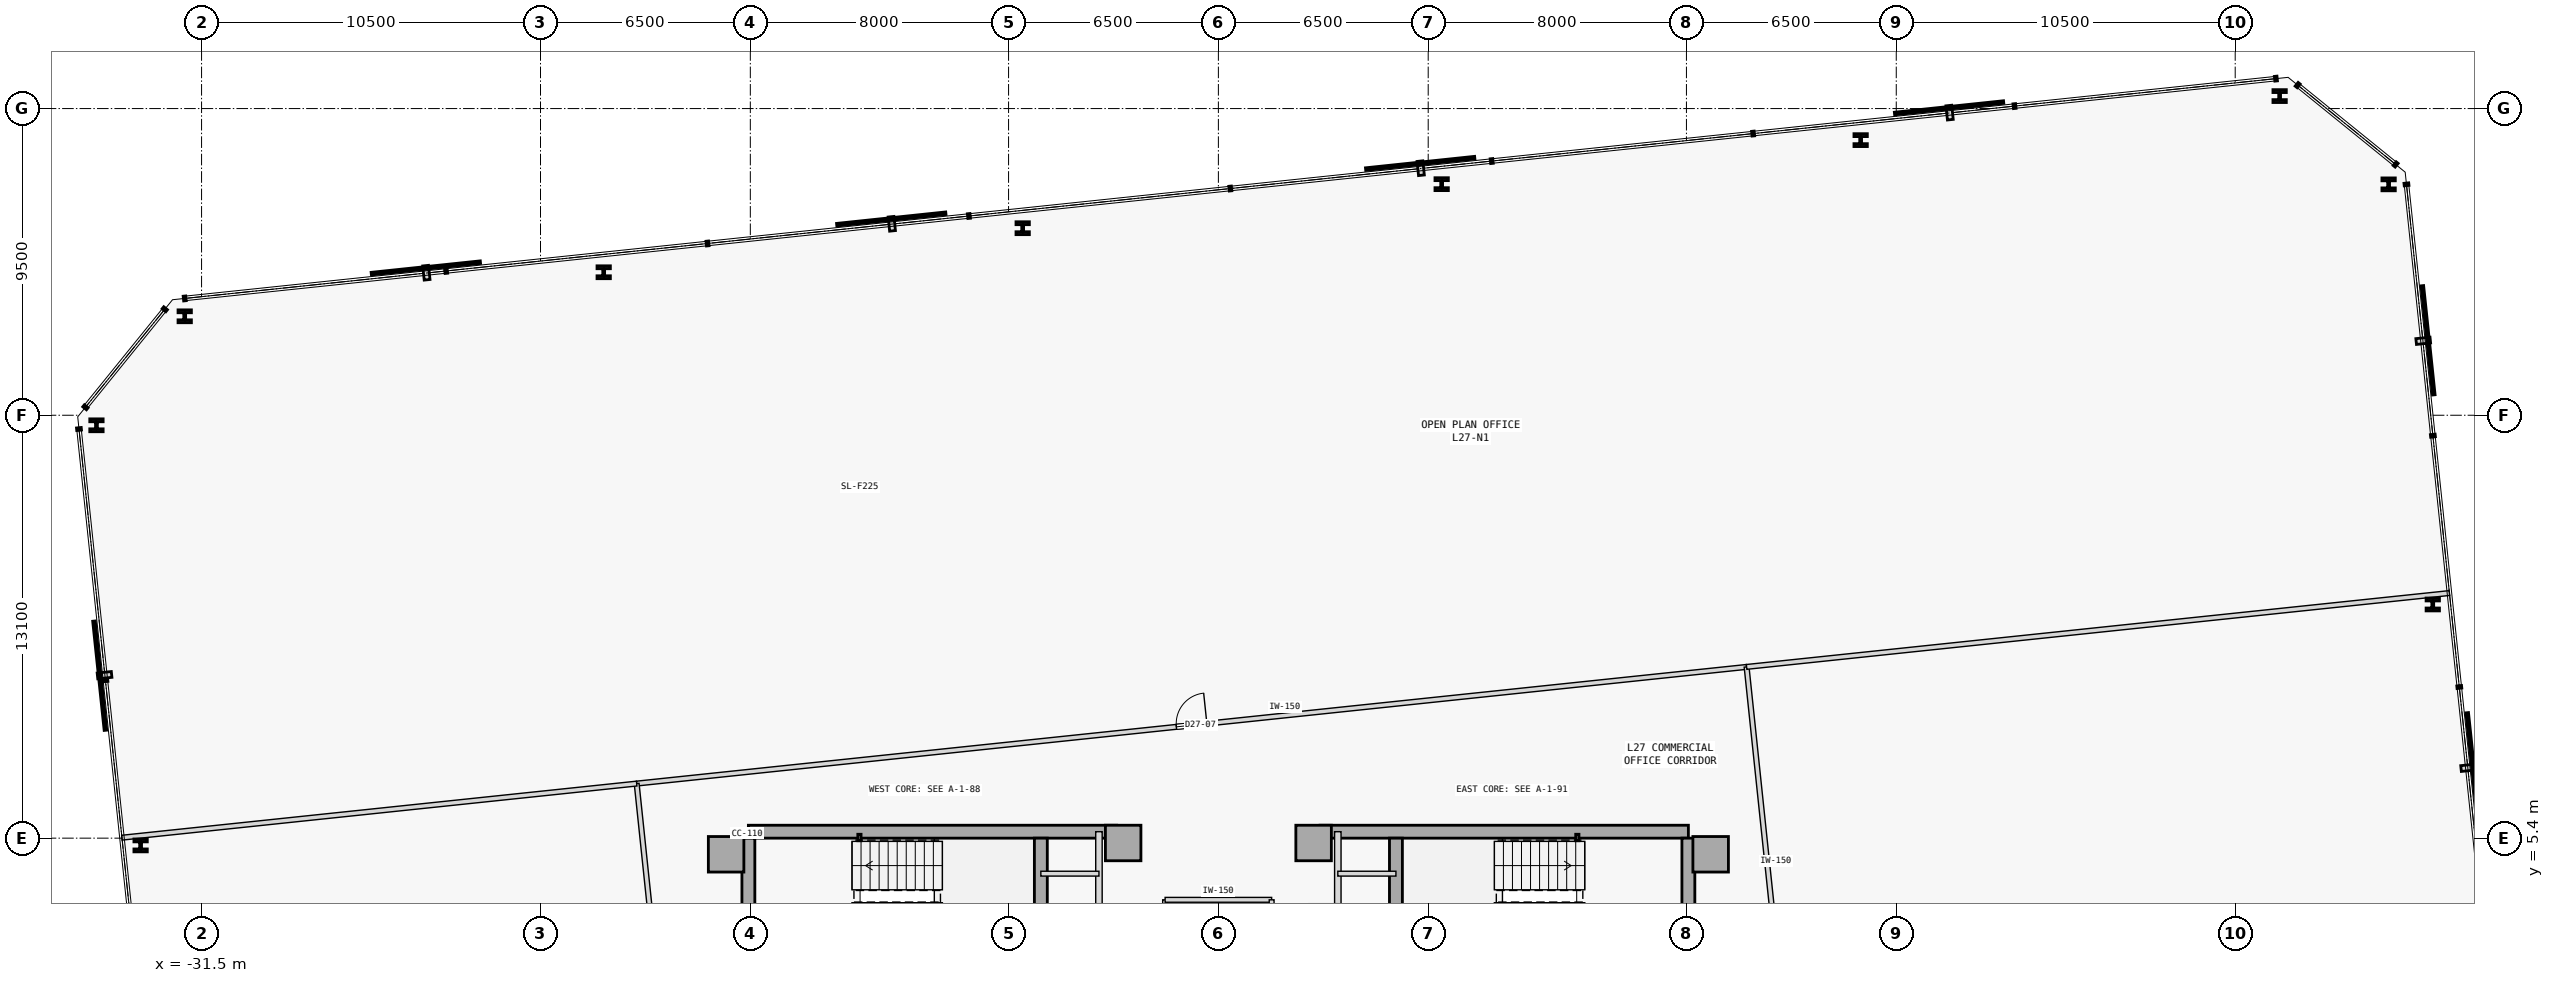
"""IFC4 building model, lengths in metres.
Left out: names, types, materials, properties, quantities, classifications, styles, units other than length and angle.
Written with IfcOpenShell. Run it as: python <this file> out.ifc"""

import sys

from ifc_helpers import new_model, si_unit, direction, frame, frame_2d, origin, origin_2d, place, context, subcontext, project, spatial, rectangle, hollow_rectangle, i_section, extrude, element, fill, save


model = new_model("IFC4")
c1 = context("Model", 3, precision=1e-05, world=origin(), true_north=direction((0.0, 1.0)))
c2 = subcontext(c1, "Body", "Model", "MODEL_VIEW")
j1 = project(units=[si_unit("LENGTHUNIT", "METRE"), si_unit("PLANEANGLEUNIT", "RADIAN")], contexts=[c1])
p1 = place(None, origin())
s1 = spatial("IfcSite", under=j1, at=p1, CompositionType="ELEMENT")
p2 = place(p1, origin())
s2 = spatial("IfcBuilding", under=s1, at=p2, CompositionType="ELEMENT")
p3 = place(p2, frame((0.0, 0.0, 109.6)))
s3 = spatial("IfcBuildingStorey", under=s2, at=p3, CompositionType="ELEMENT", Elevation=109.6)
for number, where, z_axis, x_axis in (
    (1, (-15.25, 4.9, 0.0), (0.0, 0.0, 1.0), (1.0, 0.0, 0.0)),
    (2, (-2.95, 5.25, 0.0), (0.0, 0.0, 1.0), (1.0, 0.0, 0.0)),
    (3, (15.25, 4.9, 0.0), (0.0, 0.0, 1.0), (1.0, 0.0, 0.0)),
    (4, (2.95, 5.25, 0.0), (0.0, 0.0, 1.0), (1.0, 0.0, 0.0)),
):
    element("IfcColumn", number, at=place(p3, frame(where, z_axis=z_axis, x_axis=x_axis)), inside=s3, PredefinedType="COLUMN", context=c2, shape_type="SweptSolid", body=[
        extrude(rectangle(XDim=1.1, YDim=1.1, at=origin_2d()), origin(), (0.0, 0.0, 1.0), 3.7),
    ])
p4 = place(p3, frame((-14.56, 5.6, 0.0), z_axis=(0.0, 0.0, 1.0), x_axis=(1.0, 0.0, 0.0)))
e5 = element("IfcWall", 5, at=p4, inside=s3, PredefinedType="SHEAR", context=c2, shape_type="SweptSolid", body=[
    extrude(rectangle(XDim=11.41, YDim=0.4, at=frame_2d((5.705, 0.0))), origin(), (0.0, 0.0, 1.0), 3.475),
])
p5 = place(p3, frame((-14.56, -5.4, 0.0), z_axis=(0.0, 0.0, 1.0), x_axis=(0.0, 1.0, 0.0)))
e6 = element("IfcWall", 6, at=p5, inside=s3, PredefinedType="SHEAR", context=c2, shape_type="SweptSolid", body=[
    extrude(rectangle(XDim=10.8, YDim=0.4, at=frame_2d((5.4, 0.0))), origin(), (0.0, 0.0, 1.0), 3.475),
])
p6 = place(p3, frame((-5.5, 2.15, 0.0), z_axis=(0.0, 0.0, 1.0), x_axis=(0.0, 1.0, 0.0)))
e7 = element("IfcWall", 7, at=p6, inside=s3, PredefinedType="SHEAR", context=c2, shape_type="SweptSolid", body=[
    extrude(rectangle(XDim=3.25, YDim=0.4, at=frame_2d((1.625, 0.0))), origin(), (0.0, 0.0, 1.0), 3.475),
])
p7 = place(p3, frame((3.15, 5.6, 0.0), z_axis=(0.0, 0.0, 1.0), x_axis=(1.0, 0.0, 0.0)))
e8 = element("IfcWall", 8, at=p7, inside=s3, PredefinedType="SHEAR", context=c2, shape_type="SweptSolid", body=[
    extrude(rectangle(XDim=11.41, YDim=0.4, at=frame_2d((5.705, 0.0))), origin(), (0.0, 0.0, 1.0), 3.475),
])
p8 = place(p3, frame((14.56, -5.4, 0.0), z_axis=(0.0, 0.0, 1.0), x_axis=(0.0, 1.0, 0.0)))
e9 = element("IfcWall", 9, at=p8, inside=s3, PredefinedType="SHEAR", context=c2, shape_type="SweptSolid", body=[
    extrude(rectangle(XDim=10.8, YDim=0.4, at=frame_2d((5.4, 0.0))), origin(), (0.0, 0.0, 1.0), 3.475),
])
p9 = place(p3, frame((5.5, 2.15, 0.0), z_axis=(0.0, 0.0, 1.0), x_axis=(0.0, 1.0, 0.0)))
e10 = element("IfcWall", 10, at=p9, inside=s3, PredefinedType="SHEAR", context=c2, shape_type="SweptSolid", body=[
    extrude(rectangle(XDim=3.25, YDim=0.4, at=frame_2d((1.625, 0.0))), origin(), (0.0, 0.0, 1.0), 3.475),
])
for number, where, z_axis, x_axis in (
    (11, (-11.12, 5.42, 0.0), (0.0, 0.0, 1.0), (1.0, 0.0, 0.0)),
    (12, (11.12, 5.42, 0.0), (0.0, 0.0, 1.0), (1.0, 0.0, 0.0)),
):
    element("IfcColumn", number, at=place(p3, frame(where, z_axis=z_axis, x_axis=x_axis)), inside=s3, PredefinedType="COLUMN", context=c2, shape_type="SweptSolid", body=[
        extrude(hollow_rectangle(XDim=0.1, YDim=0.2, WallThickness=0.008, at=origin_2d()), origin(), (0.0, 0.0, 1.0), 3.7),
    ])
for number, where, z_axis, x_axis in (
    (13, (37.621, 12.638, 0.0), (0.0, 0.0, 1.0), (1.0, 0.0, 0.0)),
    (14, (36.253, 25.652, 0.0), (0.0, 0.0, 1.0), (1.0, 0.0, 0.0)),
    (15, (32.876, 28.386, 0.0), (0.0, 0.0, 1.0), (1.0, 0.0, 0.0)),
    (16, (19.897, 27.022, 0.0), (0.0, 0.0, 1.0), (1.0, 0.0, 0.0)),
    (17, (6.917, 25.658, 0.0), (0.0, 0.0, 1.0), (1.0, 0.0, 0.0)),
    (18, (-6.062, 24.293, 0.0), (0.0, 0.0, 1.0), (1.0, 0.0, 0.0)),
    (19, (-19.042, 22.929, 0.0), (0.0, 0.0, 1.0), (1.0, 0.0, 0.0)),
    (20, (-32.022, 21.565, 0.0), (0.0, 0.0, 1.0), (1.0, 0.0, 0.0)),
    (21, (-34.756, 18.189, 0.0), (0.0, 0.0, 1.0), (1.0, 0.0, 0.0)),
    (22, (-33.388, 5.175, 0.0), (0.0, 0.0, 1.0), (1.0, 0.0, 0.0)),
):
    element("IfcColumn", number, at=place(p3, frame(where, z_axis=z_axis, x_axis=x_axis)), inside=s3, PredefinedType="COLUMN", context=c2, shape_type="SweptSolid", body=[
        extrude(i_section(OverallWidth=0.413, OverallDepth=0.398, WebThickness=0.056, FlangeThickness=0.089, FilletRadius=0.015, at=origin_2d()), origin(), (0.0, 0.0, 1.0), 3.7),
    ])
p10 = place(p3, frame((-3.7, -1.15, 0.0), z_axis=(0.0, 0.0, 1.0), x_axis=(0.0, 1.0, 0.0)))
e23 = element("IfcWall", 23, at=p10, inside=s3, PredefinedType="STANDARD", context=c2, shape_type="SweptSolid", body=[
    extrude(rectangle(XDim=6.75, YDim=0.2, at=frame_2d((3.375, 0.0))), origin(), (0.0, 0.0, 1.0), 3.475),
])
p11 = place(p10, frame((3.6, 0.0, 0.0)))
e24 = element("IfcOpeningElement", 24, at=p11, cuts=e23, PredefinedType="OPENING", context=c2, shape_type="SweptSolid", body=[
    extrude(rectangle(XDim=0.92, YDim=2.15, at=frame_2d((0.46, 1.075))), frame((0.0, 0.11, 0.0), z_axis=(0.0, -1.0, 0.0), x_axis=(1.0, 0.0, 0.0)), (0.0, 0.0, 1.0), 0.22),
])
p12 = place(p10, frame((0.85, 0.0, 0.0)))
e25 = element("IfcOpeningElement", 25, at=p12, cuts=e23, PredefinedType="OPENING", context=c2, shape_type="SweptSolid", body=[
    extrude(rectangle(XDim=0.9, YDim=2.15, at=frame_2d((0.45, 1.075))), frame((0.0, 0.11, 0.0), z_axis=(0.0, -1.0, 0.0), x_axis=(1.0, 0.0, 0.0)), (0.0, 0.0, 1.0), 0.22),
])
p13 = place(p3, frame((3.7, -1.15, 0.0), z_axis=(0.0, 0.0, 1.0), x_axis=(0.0, 1.0, 0.0)))
e26 = element("IfcWall", 26, at=p13, inside=s3, PredefinedType="STANDARD", context=c2, shape_type="SweptSolid", body=[
    extrude(rectangle(XDim=6.75, YDim=0.2, at=frame_2d((3.375, 0.0))), origin(), (0.0, 0.0, 1.0), 3.475),
])
p14 = place(p13, frame((3.6, 0.0, 0.0)))
e27 = element("IfcOpeningElement", 27, at=p14, cuts=e26, PredefinedType="OPENING", context=c2, shape_type="SweptSolid", body=[
    extrude(rectangle(XDim=0.92, YDim=2.15, at=frame_2d((0.46, 1.075))), frame((0.0, 0.11, 0.0), z_axis=(0.0, -1.0, 0.0), x_axis=(1.0, 0.0, 0.0)), (0.0, 0.0, 1.0), 0.22),
])
for number, where, z_axis, x_axis in (
    (28, (-5.5, 4.3, 0.0), (0.0, 0.0, 1.0), (1.0, 0.0, 0.0)),
    (29, (3.7, 4.3, 0.0), (0.0, 0.0, 1.0), (1.0, 0.0, 0.0)),
):
    element("IfcWall", number, at=place(p3, frame(where, z_axis=z_axis, x_axis=x_axis)), inside=s3, PredefinedType="PARTITIONING", context=c2, shape_type="SweptSolid", body=[
        extrude(rectangle(XDim=1.8, YDim=0.15, at=frame_2d((0.9, 0.0))), origin(), (0.0, 0.0, 1.0), 3.475),
    ])
p15 = place(p3, frame((-1.65, -3.49, 0.0), z_axis=(0.0, 0.0, 1.0), x_axis=(-0.000104928124, 0.999999994495, 0.0)))
e30 = element("IfcWall", 30, at=p15, inside=s3, PredefinedType="PARTITIONING", context=c2, shape_type="SweptSolid", body=[
    extrude(rectangle(XDim=6.98, YDim=0.15, at=frame_2d((3.49, 0.0))), origin(), (0.0, 0.0, 1.0), 3.475),
])
p16 = place(p15, frame((3.015, 0.0, 0.0)))
e31 = element("IfcOpeningElement", 31, at=p16, cuts=e30, PredefinedType="OPENING", context=c2, shape_type="SweptSolid", body=[
    extrude(rectangle(XDim=0.95, YDim=2.15, at=frame_2d((0.475, 1.075))), frame((0.0, 0.085, 0.0), z_axis=(0.0, -1.0, 0.0), x_axis=(1.0, 0.0, 0.0)), (0.0, 0.0, 1.0), 0.17),
])
p17 = place(p3, frame((-1.65, 3.49, 0.0), z_axis=(0.0, 0.0, 1.0), x_axis=(1.0, 0.0, 0.0)))
e32 = element("IfcWall", 32, at=p17, inside=s3, PredefinedType="PARTITIONING", context=c2, shape_type="SweptSolid", body=[
    extrude(rectangle(XDim=3.3, YDim=0.15, at=frame_2d((1.65, 0.0))), origin(), (0.0, 0.0, 1.0), 3.475),
])
p18 = place(p3, frame((1.65, -3.49, 0.0), z_axis=(0.0, 0.0, 1.0), x_axis=(-6.9952083e-05, 0.999999997553, 0.0)))
e33 = element("IfcWall", 33, at=p18, inside=s3, PredefinedType="PARTITIONING", context=c2, shape_type="SweptSolid", body=[
    extrude(rectangle(XDim=6.98, YDim=0.15, at=frame_2d((3.49, 0.0))), origin(), (0.0, 0.0, 1.0), 3.475),
])
p19 = place(p3, frame((-18.021, 7.09, 0.0), z_axis=(0.0, 0.0, 1.0), x_axis=(0.994522464549, 0.104523047737, 0.0)))
e34 = element("IfcWall", 34, at=p19, inside=s3, PredefinedType="PARTITIONING", context=c2, shape_type="SweptSolid", body=[
    extrude(rectangle(XDim=34.574, YDim=0.15, at=frame_2d((17.287, 0.0))), origin(), (0.0, 0.0, 1.0), 3.475),
])
p20 = place(p19, frame((16.812, 0.0, 0.0)))
e35 = element("IfcOpeningElement", 35, at=p20, cuts=e34, PredefinedType="OPENING", context=c2, shape_type="SweptSolid", body=[
    extrude(rectangle(XDim=0.95, YDim=2.15, at=frame_2d((0.475, 1.075))), frame((0.0, 0.085, 0.0), z_axis=(0.0, -1.0, 0.0), x_axis=(1.0, 0.0, 0.0)), (0.0, 0.0, 1.0), 0.17),
])
p21 = place(p3, frame((-16.153, -10.682, 0.0), z_axis=(0.0, 0.0, 1.0), x_axis=(-0.104527614588, 0.994521984568, 0.0)))
e36 = element("IfcWall", 36, at=p21, inside=s3, PredefinedType="PARTITIONING", context=c2, shape_type="SweptSolid", body=[
    extrude(rectangle(XDim=17.87, YDim=0.15, at=frame_2d((8.935, 0.0))), origin(), (0.0, 0.0, 1.0), 3.475),
])
p22 = place(p21, frame((8.46, 0.0, 0.0)))
e37 = element("IfcOpeningElement", 37, at=p22, cuts=e36, PredefinedType="OPENING", context=c2, shape_type="SweptSolid", body=[
    extrude(rectangle(XDim=0.95, YDim=2.15, at=frame_2d((0.475, 1.075))), frame((0.0, 0.085, 0.0), z_axis=(0.0, -1.0, 0.0), x_axis=(1.0, 0.0, 0.0)), (0.0, 0.0, 1.0), 0.17),
])
p23 = place(p3, frame((18.231, -7.068, 0.0), z_axis=(0.0, 0.0, 1.0), x_axis=(-0.104529034836, 0.994521835294, 0.0)))
e38 = element("IfcWall", 38, at=p23, inside=s3, PredefinedType="PARTITIONING", context=c2, shape_type="SweptSolid", body=[
    extrude(rectangle(XDim=17.87, YDim=0.15, at=frame_2d((8.935, 0.0))), origin(), (0.0, 0.0, 1.0), 3.475),
])
p24 = place(p23, frame((8.46, 0.0, 0.0)))
e39 = element("IfcOpeningElement", 39, at=p24, cuts=e38, PredefinedType="OPENING", context=c2, shape_type="SweptSolid", body=[
    extrude(rectangle(XDim=0.95, YDim=2.15, at=frame_2d((0.475, 1.075))), frame((0.0, 0.085, 0.0), z_axis=(0.0, -1.0, 0.0), x_axis=(1.0, 0.0, 0.0)), (0.0, 0.0, 1.0), 0.17),
])
p25 = place(p3, frame((-33.967, 5.414, 0.0), z_axis=(0.0, 0.0, 1.0), x_axis=(0.994521211213, 0.104534972363, 0.0)))
e40 = element("IfcWall", 40, at=p25, inside=s3, PredefinedType="PARTITIONING", context=c2, shape_type="SweptSolid", body=[
    extrude(rectangle(XDim=16.033, YDim=0.15, at=frame_2d((8.017, 0.0))), origin(), (0.0, 0.0, 1.0), 3.475),
])
p26 = place(p3, frame((16.363, 10.704, 0.0), z_axis=(0.0, 0.0, 1.0), x_axis=(0.994521206634, 0.104535015934, 0.0)))
e41 = element("IfcWall", 41, at=p26, inside=s3, PredefinedType="PARTITIONING", context=c2, shape_type="SweptSolid", body=[
    extrude(rectangle(XDim=21.893, YDim=0.15, at=frame_2d((10.946, 0.0))), origin(), (0.0, 0.0, 1.0), 3.475),
])
p27 = place(p20, origin())
e42 = element("IfcDoor", 42, at=p27, inside=s3, OperationType="SINGLE_SWING_RIGHT", PredefinedType="DOOR", context=c2, shape_type="SweptSolid", body=[
    extrude(rectangle(XDim=0.95, YDim=2.15, at=frame_2d((0.475, 1.075))), frame((0.0, 0.025, 0.0), z_axis=(0.0, -1.0, 0.0), x_axis=(1.0, 0.0, 0.0)), (0.0, 0.0, 1.0), 0.05),
])
fill(e35, e42)
save(model, sys.argv[1])
